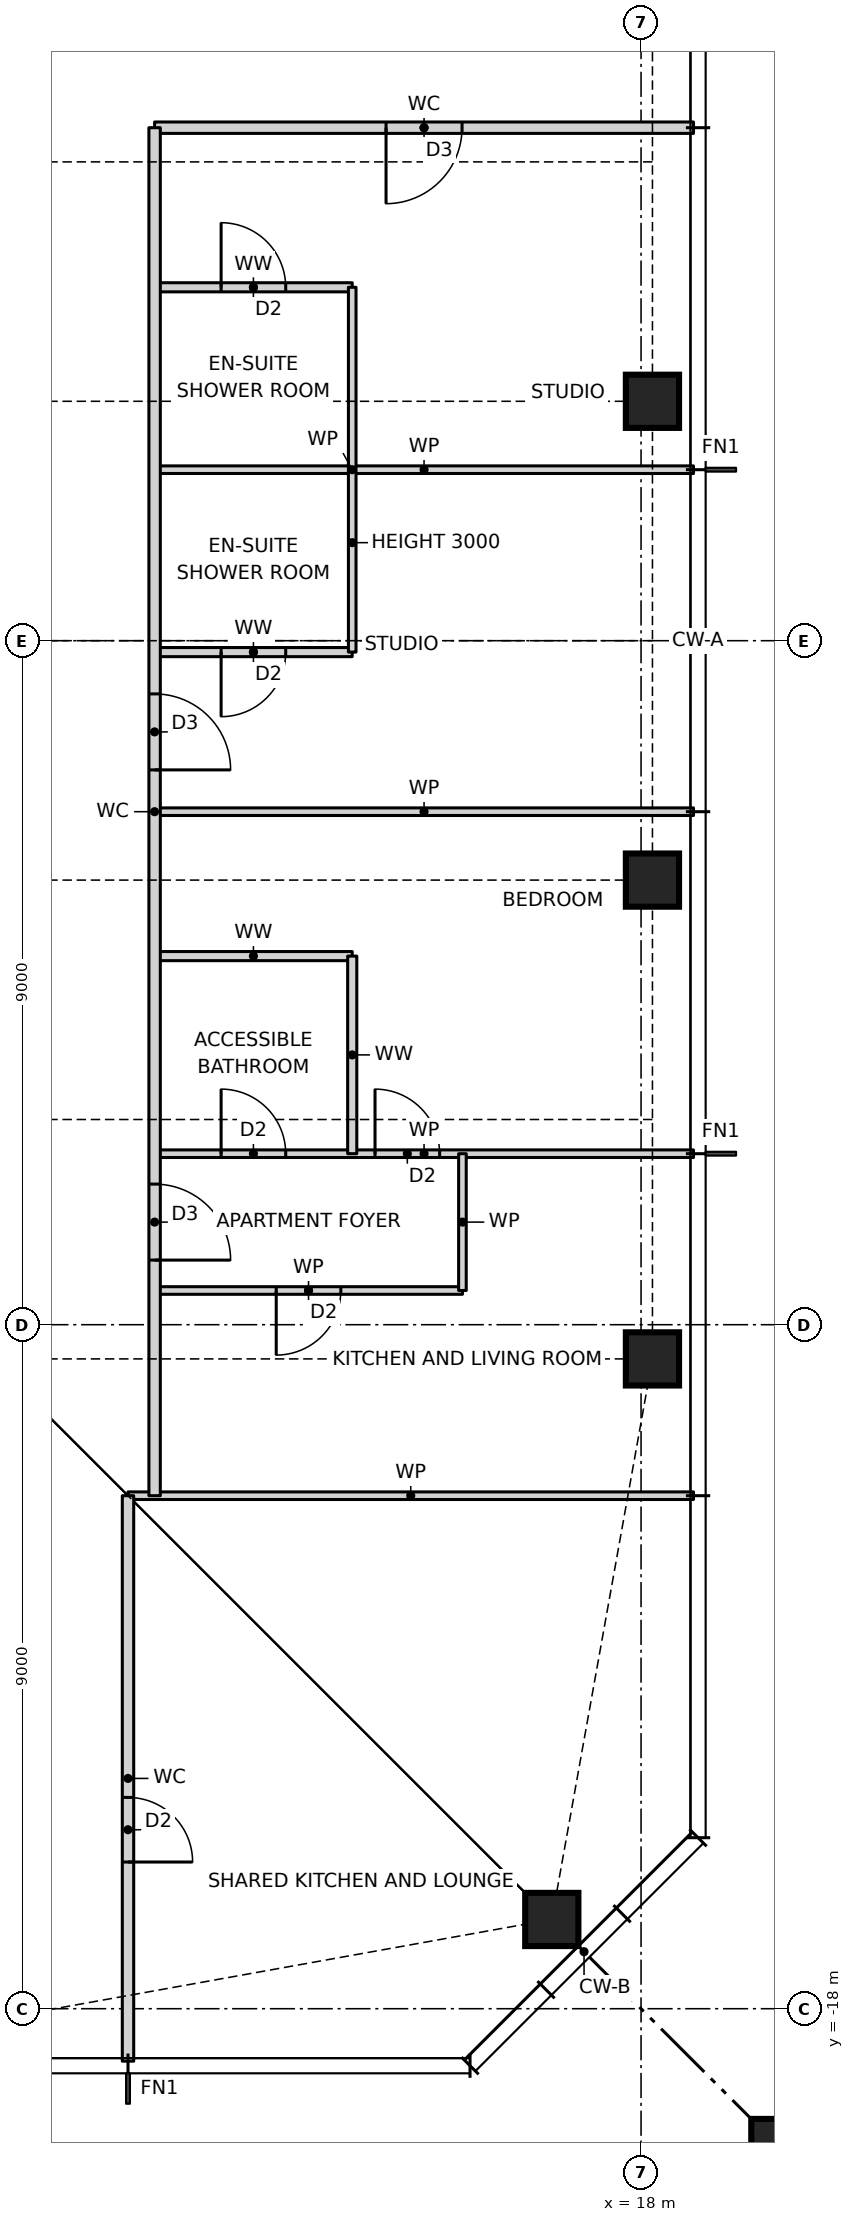
"""IFC4 building model, lengths in metres.
Left out: names, types, materials, properties, quantities, classifications, styles, units other than length and angle.
Written with IfcOpenShell. Run it as: python <this file> out.ifc"""

import sys

from ifc_helpers import new_model, si_unit, direction, frame, frame_2d, origin, origin_2d, place, context, subcontext, project, spatial, rectangle, hollow_rectangle, i_section, extrude, element, fill, save


model = new_model("IFC4")
c1 = context("Model", 3, precision=1e-05, world=origin(), true_north=direction((0.0, 1.0)))
c2 = subcontext(c1, "Body", "Model", "MODEL_VIEW")
j1 = project(units=[si_unit("LENGTHUNIT", "METRE"), si_unit("PLANEANGLEUNIT", "RADIAN")], contexts=[c1])
p1 = place(None, origin())
s1 = spatial("IfcSite", under=j1, at=p1, CompositionType="ELEMENT")
p2 = place(p1, origin())
s2 = spatial("IfcBuilding", under=s1, at=p2, CompositionType="ELEMENT")
p3 = place(p2, frame((0.0, 0.0, 156.5)))
s3 = spatial("IfcBuildingStorey", under=s2, at=p3, CompositionType="ELEMENT", Elevation=156.5)
for number, where, z_axis, x_axis in (
    (1, (16.826, -16.826, 0.0), (0.0, 0.0, 1.0), (1.0, 0.0, 0.0)),
    (2, (18.15, -9.45, 0.0), (0.0, 0.0, 1.0), (1.0, 0.0, 0.0)),
    (3, (18.15, -3.15, 0.0), (0.0, 0.0, 1.0), (1.0, 0.0, 0.0)),
    (4, (18.15, 3.15, 0.0), (0.0, 0.0, 1.0), (1.0, 0.0, 0.0)),
):
    element("IfcColumn", number, at=place(p3, frame(where, z_axis=z_axis, x_axis=x_axis)), inside=s3, PredefinedType="COLUMN", context=c2, shape_type="SweptSolid", body=[
        extrude(hollow_rectangle(XDim=0.7, YDim=0.7, WallThickness=0.06, at=origin_2d()), origin(), (0.0, 0.0, 1.0), 3.5),
    ])
p4 = place(p3, frame((21.65, -21.65, 0.0), z_axis=(0.0, 0.0, 1.0), x_axis=(1.0, 0.0, 0.0)))
e5 = element("IfcColumn", 5, at=p4, inside=s3, PredefinedType="COLUMN", context=c2, shape_type="SweptSolid", body=[
    extrude(rectangle(XDim=4.4, YDim=4.4, at=origin_2d()), origin(), (0.0, 0.0, 1.0), 3.5),
    extrude(i_section(OverallWidth=0.478, OverallDepth=0.599, WebThickness=0.1, FlangeThickness=0.14, at=origin_2d()), origin(), (0.0, 0.0, 1.0), 3.5),
])
p5 = place(p3, frame((11.25, -11.25, 0.0), z_axis=(0.0, 0.0, 1.0), x_axis=(1.0, 0.0, 0.0)))
e6 = element("IfcWall", 6, at=p5, inside=s3, PredefinedType="PARTITIONING", context=c2, shape_type="SweptSolid", body=[
    extrude(rectangle(XDim=7.44, YDim=0.1, at=frame_2d((3.72, 0.0))), origin(), (0.0, 0.0, 1.0), 3.27),
])
p6 = place(p3, frame((11.6, -8.55, 0.0), z_axis=(0.0, 0.0, 1.0), x_axis=(1.0, 0.0, 0.0)))
e7 = element("IfcWall", 7, at=p6, inside=s3, PredefinedType="PARTITIONING", context=c2, shape_type="SweptSolid", body=[
    extrude(rectangle(XDim=4.05, YDim=0.1, at=frame_2d((2.025, 0.0))), origin(), (0.0, 0.0, 1.0), 3.27),
])
p7 = place(p6, frame((1.6, 0.0, 0.0)))
e8 = element("IfcOpeningElement", 8, at=p7, cuts=e7, PredefinedType="OPENING", context=c2, shape_type="SweptSolid", body=[
    extrude(rectangle(XDim=0.85, YDim=2.1, at=frame_2d((0.425, 1.05))), frame((0.0, 0.06, 0.0), z_axis=(0.0, -1.0, 0.0), x_axis=(1.0, 0.0, 0.0)), (0.0, 0.0, 1.0), 0.12),
])
p8 = place(p3, frame((11.6, -6.75, 0.0), z_axis=(0.0, 0.0, 1.0), x_axis=(1.0, 0.0, 0.0)))
e9 = element("IfcWall", 9, at=p8, inside=s3, PredefinedType="PARTITIONING", context=c2, shape_type="SweptSolid", body=[
    extrude(rectangle(XDim=7.09, YDim=0.1, at=frame_2d((3.545, 0.0))), origin(), (0.0, 0.0, 1.0), 3.27),
])
p9 = place(p8, frame((2.9, 0.0, 0.0)))
e10 = element("IfcOpeningElement", 10, at=p9, cuts=e9, PredefinedType="OPENING", context=c2, shape_type="SweptSolid", body=[
    extrude(rectangle(XDim=0.85, YDim=2.1, at=frame_2d((0.425, 1.05))), frame((0.0, 0.06, 0.0), z_axis=(0.0, -1.0, 0.0), x_axis=(1.0, 0.0, 0.0)), (0.0, 0.0, 1.0), 0.12),
])
p10 = place(p8, frame((0.875, 0.0, 0.0)))
e11 = element("IfcOpeningElement", 11, at=p10, cuts=e9, PredefinedType="OPENING", context=c2, shape_type="SweptSolid", body=[
    extrude(rectangle(XDim=0.85, YDim=2.1, at=frame_2d((0.425, 1.05))), frame((0.0, 0.06, 0.0), z_axis=(0.0, -1.0, 0.0), x_axis=(1.0, 0.0, 0.0)), (0.0, 0.0, 1.0), 0.12),
])
p11 = place(p3, frame((11.6, -4.15, 0.0), z_axis=(0.0, 0.0, 1.0), x_axis=(1.0, 0.0, 0.0)))
e12 = element("IfcWall", 12, at=p11, inside=s3, PredefinedType="PARTITIONING", context=c2, shape_type="SweptSolid", body=[
    extrude(rectangle(XDim=2.6, YDim=0.12, at=frame_2d((1.3, 0.0))), origin(), (0.0, 0.0, 1.0), 3.27),
])
p12 = place(p3, frame((11.6, -2.25, 0.0), z_axis=(0.0, 0.0, 1.0), x_axis=(1.0, 0.0, 0.0)))
e13 = element("IfcWall", 13, at=p12, inside=s3, PredefinedType="PARTITIONING", context=c2, shape_type="SweptSolid", body=[
    extrude(rectangle(XDim=7.09, YDim=0.1, at=frame_2d((3.545, 0.0))), origin(), (0.0, 0.0, 1.0), 3.27),
])
p13 = place(p3, frame((11.6, -0.15, 0.0), z_axis=(0.0, 0.0, 1.0), x_axis=(1.0, 0.0, 0.0)))
e14 = element("IfcWall", 14, at=p13, inside=s3, PredefinedType="PARTITIONING", context=c2, shape_type="SweptSolid", body=[
    extrude(rectangle(XDim=2.6, YDim=0.12, at=frame_2d((1.3, 0.0))), origin(), (0.0, 0.0, 1.0), 3.27),
])
p14 = place(p13, frame((0.875, 0.0, 0.0)))
e15 = element("IfcOpeningElement", 15, at=p14, cuts=e14, PredefinedType="OPENING", context=c2, shape_type="SweptSolid", body=[
    extrude(rectangle(XDim=0.85, YDim=2.1, at=frame_2d((0.425, 1.05))), frame((0.0, 0.07, 0.0), z_axis=(0.0, -1.0, 0.0), x_axis=(1.0, 0.0, 0.0)), (0.0, 0.0, 1.0), 0.14),
])
p15 = place(p3, frame((11.6, 2.25, 0.0), z_axis=(0.0, 0.0, 1.0), x_axis=(1.0, 0.0, 0.0)))
e16 = element("IfcWall", 16, at=p15, inside=s3, PredefinedType="PARTITIONING", context=c2, shape_type="SweptSolid", body=[
    extrude(rectangle(XDim=7.09, YDim=0.1, at=frame_2d((3.545, 0.0))), origin(), (0.0, 0.0, 1.0), 3.27),
])
p16 = place(p3, frame((11.6, 4.65, 0.0), z_axis=(0.0, 0.0, 1.0), x_axis=(1.0, 0.0, 0.0)))
e17 = element("IfcWall", 17, at=p16, inside=s3, PredefinedType="PARTITIONING", context=c2, shape_type="SweptSolid", body=[
    extrude(rectangle(XDim=2.6, YDim=0.12, at=frame_2d((1.3, 0.0))), origin(), (0.0, 0.0, 1.0), 3.27),
])
p17 = place(p16, frame((0.875, 0.0, 0.0)))
e18 = element("IfcOpeningElement", 18, at=p17, cuts=e17, PredefinedType="OPENING", context=c2, shape_type="SweptSolid", body=[
    extrude(rectangle(XDim=0.85, YDim=2.1, at=frame_2d((0.425, 1.05))), frame((0.0, 0.07, 0.0), z_axis=(0.0, -1.0, 0.0), x_axis=(1.0, 0.0, 0.0)), (0.0, 0.0, 1.0), 0.14),
])
p18 = place(p3, frame((11.6, 6.75, 0.0), z_axis=(0.0, 0.0, 1.0), x_axis=(1.0, 0.0, 0.0)))
e19 = element("IfcWall", 19, at=p18, inside=s3, PredefinedType="PARTITIONING", context=c2, shape_type="SweptSolid", body=[
    extrude(rectangle(XDim=7.09, YDim=0.15, at=frame_2d((3.545, 0.0))), origin(), (0.0, 0.0, 1.0), 3.27),
])
p19 = place(p18, frame((3.045, 0.0, 0.0)))
e20 = element("IfcOpeningElement", 20, at=p19, cuts=e19, PredefinedType="OPENING", context=c2, shape_type="SweptSolid", body=[
    extrude(rectangle(XDim=1.0, YDim=2.1, at=frame_2d((0.5, 1.05))), frame((0.0, 0.085, 0.0), z_axis=(0.0, -1.0, 0.0), x_axis=(1.0, 0.0, 0.0)), (0.0, 0.0, 1.0), 0.17),
])
p20 = place(p3, frame((15.65, -8.55, 0.0), z_axis=(0.0, 0.0, 1.0), x_axis=(0.0, 1.0, 0.0)))
e21 = element("IfcWall", 21, at=p20, inside=s3, PredefinedType="PARTITIONING", context=c2, shape_type="SweptSolid", body=[
    extrude(rectangle(XDim=1.8, YDim=0.1, at=frame_2d((0.9, 0.0))), origin(), (0.0, 0.0, 1.0), 3.27),
])
p21 = place(p3, frame((14.2, -6.75, 0.0), z_axis=(0.0, 0.0, 1.0), x_axis=(0.0, 1.0, 0.0)))
e22 = element("IfcWall", 22, at=p21, inside=s3, PredefinedType="PARTITIONING", context=c2, shape_type="SweptSolid", body=[
    extrude(rectangle(XDim=2.6, YDim=0.12, at=frame_2d((1.3, 0.0))), origin(), (0.0, 0.0, 1.0), 3.27),
])
p22 = place(p3, frame((14.2, -0.15, 0.0), z_axis=(0.0, 0.0, 1.0), x_axis=(0.0, 1.0, 0.0)))
e23 = element("IfcWall", 23, at=p22, inside=s3, PredefinedType="PARTITIONING", context=c2, shape_type="SweptSolid", body=[
    extrude(rectangle(XDim=4.8, YDim=0.1, at=frame_2d((2.4, 0.0))), origin(), (0.0, 0.0, 1.0), 3.0),
])
p23 = place(p3, frame((11.6, -11.25, 0.0), z_axis=(0.0, 0.0, 1.0), x_axis=(0.0, 1.0, 0.0)))
e24 = element("IfcWall", 24, at=p23, inside=s3, PredefinedType="PARTITIONING", context=c2, shape_type="SweptSolid", body=[
    extrude(rectangle(XDim=18.0, YDim=0.15, at=frame_2d((9.0, 0.0))), origin(), (0.0, 0.0, 1.0), 3.27),
])
p24 = place(p23, frame((3.1, 0.0, 0.0)))
e25 = element("IfcOpeningElement", 25, at=p24, cuts=e24, PredefinedType="OPENING", context=c2, shape_type="SweptSolid", body=[
    extrude(rectangle(XDim=1.0, YDim=2.1, at=frame_2d((0.5, 1.05))), frame((0.0, 0.085, 0.0), z_axis=(0.0, -1.0, 0.0), x_axis=(1.0, 0.0, 0.0)), (0.0, 0.0, 1.0), 0.17),
])
p25 = place(p23, frame((9.55, 0.0, 0.0)))
e26 = element("IfcOpeningElement", 26, at=p25, cuts=e24, PredefinedType="OPENING", context=c2, shape_type="SweptSolid", body=[
    extrude(rectangle(XDim=1.0, YDim=2.1, at=frame_2d((0.5, 1.05))), frame((0.0, 0.085, 0.0), z_axis=(0.0, -1.0, 0.0), x_axis=(1.0, 0.0, 0.0)), (0.0, 0.0, 1.0), 0.17),
])
p26 = place(p3, frame((11.25, -18.69, 0.0), z_axis=(0.0, 0.0, 1.0), x_axis=(0.0, 1.0, 0.0)))
e27 = element("IfcWall", 27, at=p26, inside=s3, PredefinedType="PARTITIONING", context=c2, shape_type="SweptSolid", body=[
    extrude(rectangle(XDim=7.44, YDim=0.15, at=frame_2d((3.72, 0.0))), origin(), (0.0, 0.0, 1.0), 3.27),
])
p27 = place(p26, frame((2.62, 0.0, 0.0)))
e28 = element("IfcOpeningElement", 28, at=p27, cuts=e27, PredefinedType="OPENING", context=c2, shape_type="SweptSolid", body=[
    extrude(rectangle(XDim=0.85, YDim=2.1, at=frame_2d((0.425, 1.05))), frame((0.0, 0.085, 0.0), z_axis=(0.0, -1.0, 0.0), x_axis=(1.0, 0.0, 0.0)), (0.0, 0.0, 1.0), 0.17),
])
p28 = place(p24, frame((1.0, 0.0, 0.0), z_axis=(0.0, 0.0, 1.0), x_axis=(-1.0, 0.0, 0.0)))
e29 = element("IfcDoor", 29, at=p28, inside=s3, OperationType="SINGLE_SWING_RIGHT", PredefinedType="DOOR", context=c2, shape_type="SweptSolid", body=[
    extrude(rectangle(XDim=1.0, YDim=2.1, at=frame_2d((0.5, 1.05))), frame((0.0, 0.025, 0.0), z_axis=(0.0, -1.0, 0.0), x_axis=(1.0, 0.0, 0.0)), (0.0, 0.0, 1.0), 0.05),
])
fill(e25, e29)
p29 = place(p7, frame((0.85, 0.0, 0.0), z_axis=(0.0, 0.0, 1.0), x_axis=(-1.0, 0.0, 0.0)))
e30 = element("IfcDoor", 30, at=p29, inside=s3, OperationType="SINGLE_SWING_RIGHT", PredefinedType="DOOR", context=c2, shape_type="SweptSolid", body=[
    extrude(rectangle(XDim=0.85, YDim=2.1, at=frame_2d((0.425, 1.05))), frame((0.0, 0.025, 0.0), z_axis=(0.0, -1.0, 0.0), x_axis=(1.0, 0.0, 0.0)), (0.0, 0.0, 1.0), 0.05),
])
fill(e8, e30)
p30 = place(p9, origin())
e31 = element("IfcDoor", 31, at=p30, inside=s3, OperationType="SINGLE_SWING_LEFT", PredefinedType="DOOR", context=c2, shape_type="SweptSolid", body=[
    extrude(rectangle(XDim=0.85, YDim=2.1, at=frame_2d((0.425, 1.05))), frame((0.0, 0.025, 0.0), z_axis=(0.0, -1.0, 0.0), x_axis=(1.0, 0.0, 0.0)), (0.0, 0.0, 1.0), 0.05),
])
fill(e10, e31)
p31 = place(p10, origin())
e32 = element("IfcDoor", 32, at=p31, inside=s3, OperationType="SINGLE_SWING_LEFT", PredefinedType="DOOR", context=c2, shape_type="SweptSolid", body=[
    extrude(rectangle(XDim=0.85, YDim=2.1, at=frame_2d((0.425, 1.05))), frame((0.0, 0.025, 0.0), z_axis=(0.0, -1.0, 0.0), x_axis=(1.0, 0.0, 0.0)), (0.0, 0.0, 1.0), 0.05),
])
fill(e11, e32)
p32 = place(p25, frame((1.0, 0.0, 0.0), z_axis=(0.0, 0.0, 1.0), x_axis=(-1.0, 0.0, 0.0)))
e33 = element("IfcDoor", 33, at=p32, inside=s3, OperationType="SINGLE_SWING_RIGHT", PredefinedType="DOOR", context=c2, shape_type="SweptSolid", body=[
    extrude(rectangle(XDim=1.0, YDim=2.1, at=frame_2d((0.5, 1.05))), frame((0.0, 0.025, 0.0), z_axis=(0.0, -1.0, 0.0), x_axis=(1.0, 0.0, 0.0)), (0.0, 0.0, 1.0), 0.05),
])
fill(e26, e33)
p33 = place(p14, frame((0.85, 0.0, 0.0), z_axis=(0.0, 0.0, 1.0), x_axis=(-1.0, 0.0, 0.0)))
e34 = element("IfcDoor", 34, at=p33, inside=s3, OperationType="SINGLE_SWING_RIGHT", PredefinedType="DOOR", context=c2, shape_type="SweptSolid", body=[
    extrude(rectangle(XDim=0.85, YDim=2.1, at=frame_2d((0.425, 1.05))), frame((0.0, 0.025, 0.0), z_axis=(0.0, -1.0, 0.0), x_axis=(1.0, 0.0, 0.0)), (0.0, 0.0, 1.0), 0.05),
])
fill(e15, e34)
p34 = place(p19, frame((1.0, 0.0, 0.0), z_axis=(0.0, 0.0, 1.0), x_axis=(-1.0, 0.0, 0.0)))
e35 = element("IfcDoor", 35, at=p34, inside=s3, OperationType="SINGLE_SWING_RIGHT", PredefinedType="DOOR", context=c2, shape_type="SweptSolid", body=[
    extrude(rectangle(XDim=1.0, YDim=2.1, at=frame_2d((0.5, 1.05))), frame((0.0, 0.025, 0.0), z_axis=(0.0, -1.0, 0.0), x_axis=(1.0, 0.0, 0.0)), (0.0, 0.0, 1.0), 0.05),
])
fill(e20, e35)
p35 = place(p17, origin())
e36 = element("IfcDoor", 36, at=p35, inside=s3, OperationType="SINGLE_SWING_LEFT", PredefinedType="DOOR", context=c2, shape_type="SweptSolid", body=[
    extrude(rectangle(XDim=0.85, YDim=2.1, at=frame_2d((0.425, 1.05))), frame((0.0, 0.025, 0.0), z_axis=(0.0, -1.0, 0.0), x_axis=(1.0, 0.0, 0.0)), (0.0, 0.0, 1.0), 0.05),
])
fill(e18, e36)
p36 = place(p27, frame((0.85, 0.0, 0.0), z_axis=(0.0, 0.0, 1.0), x_axis=(-1.0, 0.0, 0.0)))
e37 = element("IfcDoor", 37, at=p36, inside=s3, OperationType="SINGLE_SWING_RIGHT", PredefinedType="DOOR", context=c2, shape_type="SweptSolid", body=[
    extrude(rectangle(XDim=0.85, YDim=2.1, at=frame_2d((0.425, 1.05))), frame((0.0, 0.025, 0.0), z_axis=(0.0, -1.0, 0.0), x_axis=(1.0, 0.0, 0.0)), (0.0, 0.0, 1.0), 0.05),
])
fill(e28, e37)
save(model, sys.argv[1])
